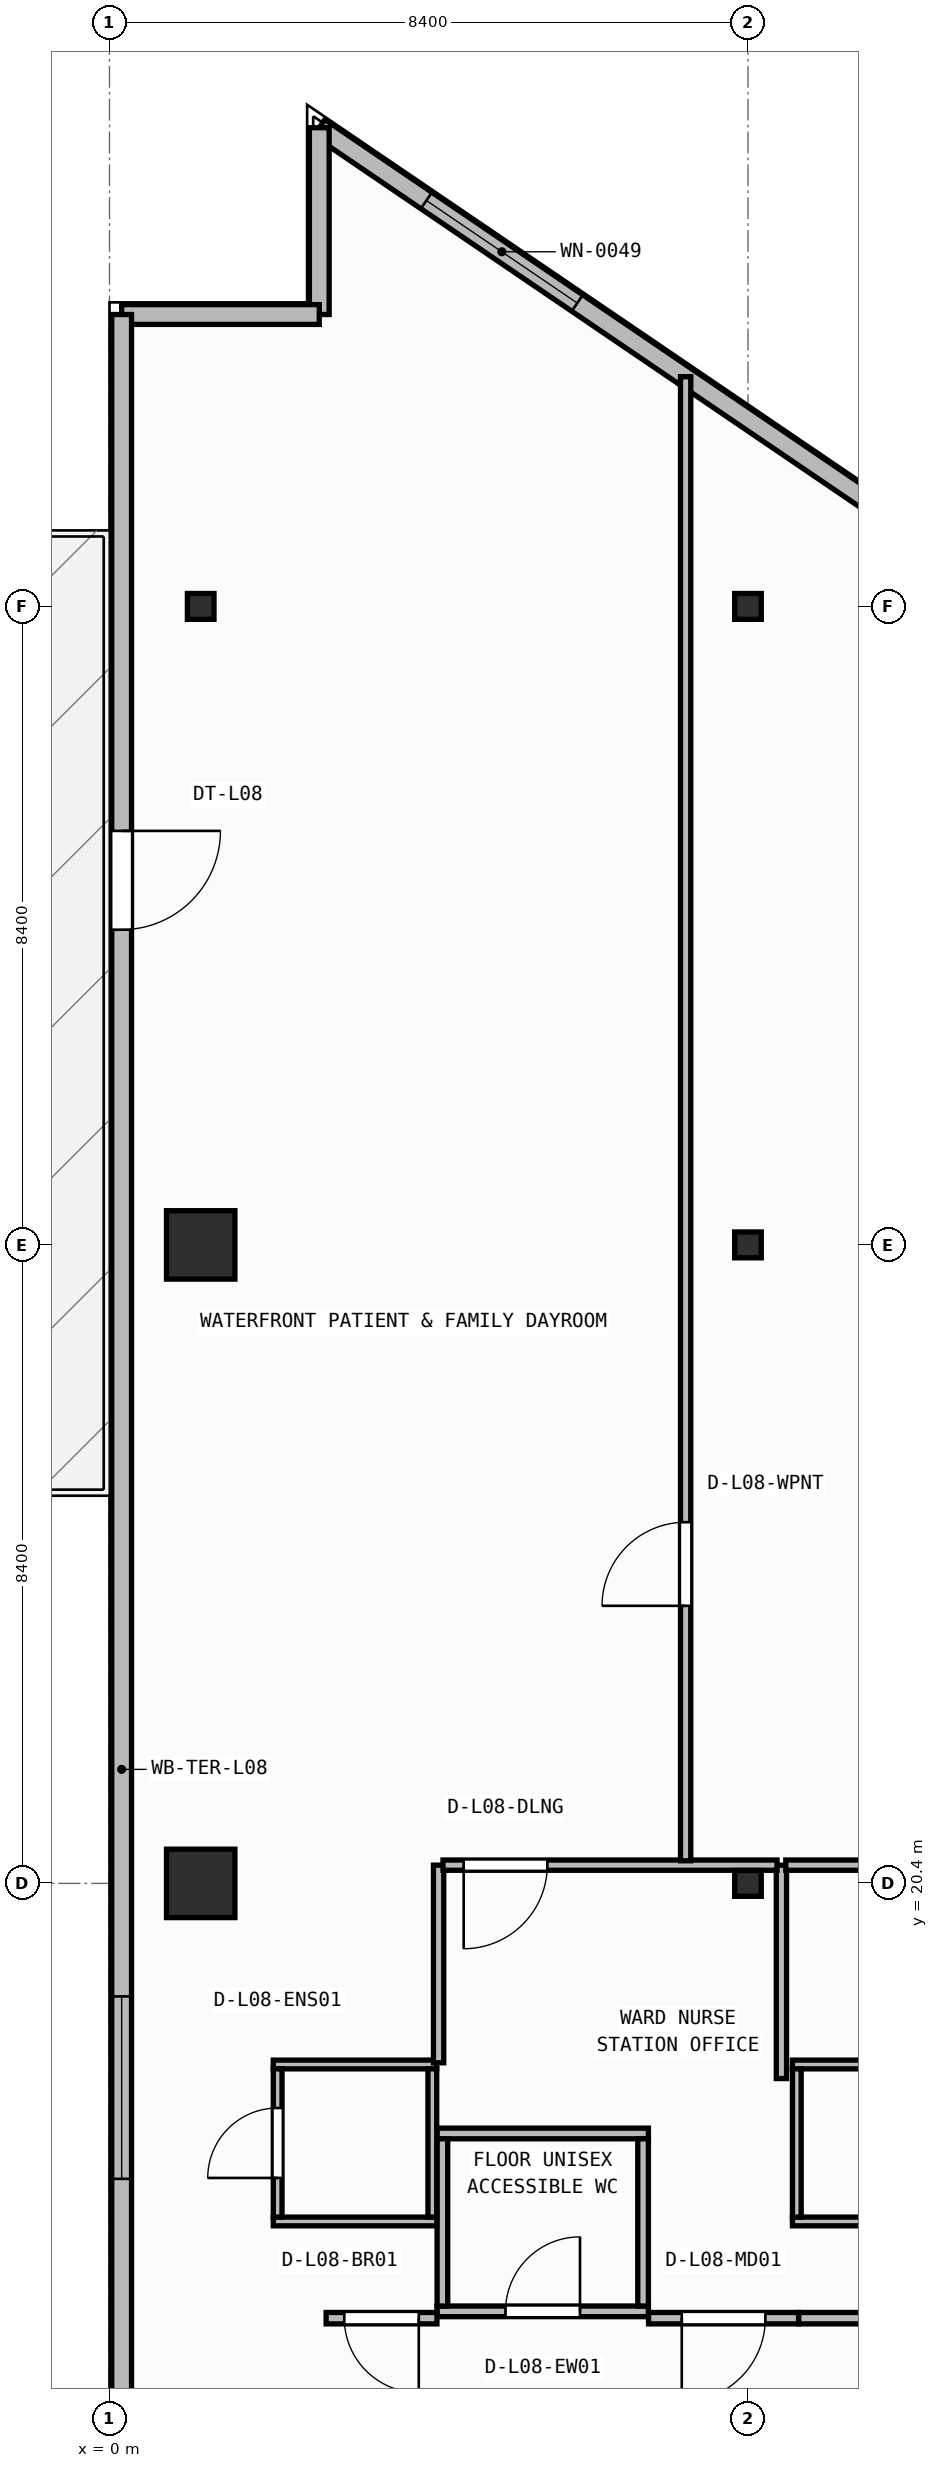
"""IFC4 building model, lengths in metres.
Left out: names, types, materials, properties, quantities, classifications, styles, units other than length and angle.
Written with IfcOpenShell. Run it as: python <this file> out.ifc"""

import sys

from ifc_helpers import new_model, si_unit, direction, frame, frame_2d, origin, origin_2d, place, context, subcontext, project, spatial, rectangle, i_section, extrude, element, fill, save


model = new_model("IFC4")
c1 = context("Model", 3, precision=1e-05, world=origin(), true_north=direction((0.0, 1.0)))
c2 = subcontext(c1, "Body", "Model", "MODEL_VIEW")
j1 = project(units=[si_unit("LENGTHUNIT", "METRE"), si_unit("PLANEANGLEUNIT", "RADIAN")], contexts=[c1])
p1 = place(None, origin())
s1 = spatial("IfcSite", under=j1, at=p1, CompositionType="ELEMENT")
p2 = place(p1, origin())
s2 = spatial("IfcBuilding", under=s1, at=p2, CompositionType="ELEMENT")
p3 = place(p2, frame((0.0, 0.0, 34.35)))
s3 = spatial("IfcBuildingStorey", under=s2, at=p3, CompositionType="ELEMENT", Elevation=34.35)
p4 = place(p3, frame((1.2, 20.4, 0.0), z_axis=(0.0, 0.0, 1.0), x_axis=(1.0, 0.0, 0.0)))
e1 = element("IfcColumn", 1, at=p4, inside=s3, PredefinedType="COLUMN", context=c2, shape_type="SweptSolid", body=[
    extrude(rectangle(XDim=0.9, YDim=0.9, at=origin_2d()), origin(), (0.0, 0.0, 1.0), 3.95),
])
p5 = place(p3, frame((8.4, 20.4, 0.0), z_axis=(0.0, 0.0, 1.0), x_axis=(1.0, 0.0, 0.0)))
e2 = element("IfcColumn", 2, at=p5, inside=s3, PredefinedType="COLUMN", context=c2, shape_type="SweptSolid", body=[
    extrude(i_section(OverallWidth=0.35, OverallDepth=0.34, WebThickness=0.016, FlangeThickness=0.028, at=origin_2d()), origin(), (0.0, 0.0, 1.0), 3.95),
])
p6 = place(p3, frame((1.2, 28.8, 0.0), z_axis=(0.0, 0.0, 1.0), x_axis=(1.0, 0.0, 0.0)))
e3 = element("IfcColumn", 3, at=p6, inside=s3, PredefinedType="COLUMN", context=c2, shape_type="SweptSolid", body=[
    extrude(rectangle(XDim=0.9, YDim=0.9, at=origin_2d()), origin(), (0.0, 0.0, 1.0), 3.95),
])
for number, where, z_axis, x_axis in (
    (4, (8.4, 28.8, 0.0), (0.0, 0.0, 1.0), (1.0, 0.0, 0.0)),
    (5, (1.2, 37.2, 0.0), (0.0, 0.0, 1.0), (1.0, 0.0, 0.0)),
    (6, (8.4, 37.2, 0.0), (0.0, 0.0, 1.0), (1.0, 0.0, 0.0)),
):
    element("IfcColumn", number, at=place(p3, frame(where, z_axis=z_axis, x_axis=x_axis)), inside=s3, PredefinedType="COLUMN", context=c2, shape_type="SweptSolid", body=[
        extrude(i_section(OverallWidth=0.35, OverallDepth=0.34, WebThickness=0.016, FlangeThickness=0.028, at=origin_2d()), origin(), (0.0, 0.0, 1.0), 3.95),
    ])
p7 = place(p3, frame((11.561, 37.517, 0.0), z_axis=(0.0, 0.0, 1.0), x_axis=(-0.827064743936, 0.562106670782, 0.0)))
e7 = element("IfcWall", 7, at=p7, inside=s3, PredefinedType="STANDARD", context=c2, shape_type="SweptSolid", body=[
    extrude(rectangle(XDim=10.641, YDim=0.26, at=frame_2d((5.32, 0.0))), origin(), (0.0, 0.0, 1.0), 3.71),
])
p8 = place(p7, frame((6.537, 0.0, 0.9)))
e8 = element("IfcOpeningElement", 8, at=p8, cuts=e7, PredefinedType="OPENING", context=c2, shape_type="SweptSolid", body=[
    extrude(rectangle(XDim=2.4, YDim=1.65, at=frame_2d((1.2, 0.825))), frame((0.0, 0.14, 0.0), z_axis=(0.0, -1.0, 0.0), x_axis=(1.0, 0.0, 0.0)), (0.0, 0.0, 1.0), 0.28),
])
p9 = place(p3, frame((2.76, 43.498, 0.0), z_axis=(0.0, 0.0, 1.0), x_axis=(0.0, -1.0, 0.0)))
e9 = element("IfcWall", 9, at=p9, inside=s3, PredefinedType="STANDARD", context=c2, shape_type="SweptSolid", body=[
    extrude(rectangle(XDim=2.458, YDim=0.26, at=frame_2d((1.229, 0.0))), origin(), (0.0, 0.0, 1.0), 3.71),
])
p10 = place(p3, frame((2.76, 41.04, 0.0), z_axis=(0.0, 0.0, 1.0), x_axis=(-1.0, 0.0, 0.0)))
e10 = element("IfcWall", 10, at=p10, inside=s3, PredefinedType="STANDARD", context=c2, shape_type="SweptSolid", body=[
    extrude(rectangle(XDim=2.6, YDim=0.26, at=frame_2d((1.3, 0.0))), origin(), (0.0, 0.0, 1.0), 3.71),
])
p11 = place(p3, frame((0.16, 41.04, 0.0), z_axis=(0.0, 0.0, 1.0), x_axis=(0.0, -1.0, 0.0)))
e11 = element("IfcWall", 11, at=p11, inside=s3, PredefinedType="STANDARD", context=c2, shape_type="SweptSolid", body=[
    extrude(rectangle(XDim=38.28, YDim=0.26, at=frame_2d((19.14, 0.0))), origin(), (0.0, 0.0, 1.0), 3.71),
])
p12 = place(p11, frame((6.793, 0.0, 0.0)))
e12 = element("IfcOpeningElement", 12, at=p12, cuts=e11, PredefinedType="OPENING", context=c2, shape_type="SweptSolid", body=[
    extrude(rectangle(XDim=1.3, YDim=2.15, at=frame_2d((0.65, 1.075))), frame((0.0, 0.14, 0.0), z_axis=(0.0, -1.0, 0.0), x_axis=(1.0, 0.0, 0.0)), (0.0, 0.0, 1.0), 0.28),
])
p13 = place(p11, frame((22.127, 0.0, 0.9)))
e13 = element("IfcOpeningElement", 13, at=p13, cuts=e11, PredefinedType="OPENING", context=c2, shape_type="SweptSolid", body=[
    extrude(rectangle(XDim=2.4, YDim=1.65, at=frame_2d((1.2, 0.825))), frame((0.0, 0.14, 0.0), z_axis=(0.0, -1.0, 0.0), x_axis=(1.0, 0.0, 0.0)), (0.0, 0.0, 1.0), 0.28),
])
p14 = place(p3, frame((4.31, 14.77, 0.0), z_axis=(0.0, 0.0, 1.0), x_axis=(1.0, 0.0, 0.0)))
e14 = element("IfcWall", 14, at=p14, inside=s3, PredefinedType="PARTITIONING", context=c2, shape_type="SweptSolid", body=[
    extrude(rectangle(XDim=2.78, YDim=0.14, at=frame_2d((1.39, 0.0))), origin(), (0.0, 0.0, 1.0), 3.71),
])
p15 = place(p14, frame((0.9, 0.0, 0.0)))
e15 = element("IfcOpeningElement", 15, at=p15, cuts=e14, PredefinedType="OPENING", context=c2, shape_type="SweptSolid", body=[
    extrude(rectangle(XDim=0.98, YDim=2.1, at=frame_2d((0.49, 1.05))), frame((0.0, 0.08, 0.0), z_axis=(0.0, -1.0, 0.0), x_axis=(1.0, 0.0, 0.0)), (0.0, 0.0, 1.0), 0.16),
])
p16 = place(p3, frame((4.31, 17.11, 0.0), z_axis=(0.0, 0.0, 1.0), x_axis=(1.0, 0.0, 0.0)))
e16 = element("IfcWall", 16, at=p16, inside=s3, PredefinedType="PARTITIONING", context=c2, shape_type="SweptSolid", body=[
    extrude(rectangle(XDim=2.78, YDim=0.14, at=frame_2d((1.39, 0.0))), origin(), (0.0, 0.0, 1.0), 3.71),
])
for number, where, z_axis, x_axis in (
    (17, (4.38, 14.84, 0.0), (0.0, 0.0, 1.0), (0.0, 1.0, 0.0)),
    (18, (7.02, 14.84, 0.0), (0.0, 0.0, 1.0), (0.0, 1.0, 0.0)),
):
    element("IfcWall", number, at=place(p3, frame(where, z_axis=z_axis, x_axis=x_axis)), inside=s3, PredefinedType="PARTITIONING", context=c2, shape_type="SweptSolid", body=[
        extrude(rectangle(XDim=2.2, YDim=0.14, at=frame_2d((1.1, 0.0))), origin(), (0.0, 0.0, 1.0), 3.71),
    ])
for number, where, z_axis, x_axis in (
    (19, (2.155, 15.952, 0.0), (0.0, 0.0, 1.0), (1.0, 0.0, 0.0)),
    (20, (2.155, 18.018, 0.0), (0.0, 0.0, 1.0), (1.0, 0.0, 0.0)),
):
    element("IfcWall", number, at=place(p3, frame(where, z_axis=z_axis, x_axis=x_axis)), inside=s3, PredefinedType="PARTITIONING", context=c2, shape_type="SweptSolid", body=[
        extrude(rectangle(XDim=2.15, YDim=0.115, at=frame_2d((1.075, 0.0))), origin(), (0.0, 0.0, 1.0), 3.71),
    ])
p17 = place(p3, frame((2.212, 16.01, 0.0), z_axis=(0.0, 0.0, 1.0), x_axis=(0.0, 1.0, 0.0)))
e21 = element("IfcWall", 21, at=p17, inside=s3, PredefinedType="PARTITIONING", context=c2, shape_type="SweptSolid", body=[
    extrude(rectangle(XDim=1.95, YDim=0.115, at=frame_2d((0.975, 0.0))), origin(), (0.0, 0.0, 1.0), 3.71),
])
p18 = place(p17, frame((0.515, 0.0, 0.0)))
e22 = element("IfcOpeningElement", 22, at=p18, cuts=e21, PredefinedType="OPENING", context=c2, shape_type="SweptSolid", body=[
    extrude(rectangle(XDim=0.92, YDim=2.1, at=frame_2d((0.46, 1.05))), frame((0.0, 0.067, 0.0), z_axis=(0.0, -1.0, 0.0), x_axis=(1.0, 0.0, 0.0)), (0.0, 0.0, 1.0), 0.135),
])
p19 = place(p3, frame((4.248, 16.01, 0.0), z_axis=(0.0, 0.0, 1.0), x_axis=(0.0, 1.0, 0.0)))
e23 = element("IfcWall", 23, at=p19, inside=s3, PredefinedType="PARTITIONING", context=c2, shape_type="SweptSolid", body=[
    extrude(rectangle(XDim=1.95, YDim=0.115, at=frame_2d((0.975, 0.0))), origin(), (0.0, 0.0, 1.0), 3.71),
])
for number, where, z_axis, x_axis in (
    (24, (8.985, 15.952, 0.0), (0.0, 0.0, 1.0), (1.0, 0.0, 0.0)),
    (25, (8.985, 18.018, 0.0), (0.0, 0.0, 1.0), (1.0, 0.0, 0.0)),
):
    element("IfcWall", number, at=place(p3, frame(where, z_axis=z_axis, x_axis=x_axis)), inside=s3, PredefinedType="PARTITIONING", context=c2, shape_type="SweptSolid", body=[
        extrude(rectangle(XDim=2.15, YDim=0.115, at=frame_2d((1.075, 0.0))), origin(), (0.0, 0.0, 1.0), 3.71),
    ])
p20 = place(p3, frame((9.042, 16.01, 0.0), z_axis=(0.0, 0.0, 1.0), x_axis=(0.0, 1.0, 0.0)))
e26 = element("IfcWall", 26, at=p20, inside=s3, PredefinedType="PARTITIONING", context=c2, shape_type="SweptSolid", body=[
    extrude(rectangle(XDim=1.95, YDim=0.115, at=frame_2d((0.975, 0.0))), origin(), (0.0, 0.0, 1.0), 3.71),
])
p21 = place(p3, frame((4.308, 14.68, 0.0), z_axis=(0.0, 0.0, 1.0), x_axis=(-1.0, 0.0, 0.0)))
e27 = element("IfcWall", 27, at=p21, inside=s3, PredefinedType="PARTITIONING", context=c2, shape_type="SweptSolid", body=[
    extrude(rectangle(XDim=1.458, YDim=0.15, at=frame_2d((0.729, 0.0))), origin(), (0.0, 0.0, 1.0), 3.71),
])
p22 = place(p21, frame((0.239, 0.0, 0.0)))
e28 = element("IfcOpeningElement", 28, at=p22, cuts=e27, PredefinedType="OPENING", context=c2, shape_type="SweptSolid", body=[
    extrude(rectangle(XDim=0.98, YDim=2.1, at=frame_2d((0.49, 1.05))), frame((0.0, 0.085, 0.0), z_axis=(0.0, -1.0, 0.0), x_axis=(1.0, 0.0, 0.0)), (0.0, 0.0, 1.0), 0.17),
])
p23 = place(p3, frame((9.066, 14.68, 0.0), z_axis=(0.0, 0.0, 1.0), x_axis=(-1.0, 0.0, 0.0)))
e29 = element("IfcWall", 29, at=p23, inside=s3, PredefinedType="PARTITIONING", context=c2, shape_type="SweptSolid", body=[
    extrude(rectangle(XDim=1.974, YDim=0.15, at=frame_2d((0.987, 0.0))), origin(), (0.0, 0.0, 1.0), 3.71),
])
p24 = place(p23, frame((0.437, 0.0, 0.0)))
e30 = element("IfcOpeningElement", 30, at=p24, cuts=e29, PredefinedType="OPENING", context=c2, shape_type="SweptSolid", body=[
    extrude(rectangle(XDim=1.1, YDim=2.1, at=frame_2d((0.55, 1.05))), frame((0.0, 0.085, 0.0), z_axis=(0.0, -1.0, 0.0), x_axis=(1.0, 0.0, 0.0)), (0.0, 0.0, 1.0), 0.17),
])
p25 = place(p3, frame((13.936, 14.68, 0.0), z_axis=(0.0, 0.0, 1.0), x_axis=(-1.0, 0.0, 0.0)))
e31 = element("IfcWall", 31, at=p25, inside=s3, PredefinedType="PARTITIONING", context=c2, shape_type="SweptSolid", body=[
    extrude(rectangle(XDim=4.868, YDim=0.15, at=frame_2d((2.434, 0.0))), origin(), (0.0, 0.0, 1.0), 3.71),
])
p26 = place(p25, frame((1.784, 0.0, 0.0)))
e32 = element("IfcOpeningElement", 32, at=p26, cuts=e31, PredefinedType="OPENING", context=c2, shape_type="SweptSolid", body=[
    extrude(rectangle(XDim=1.3, YDim=2.15, at=frame_2d((0.65, 1.075))), frame((0.0, 0.085, 0.0), z_axis=(0.0, -1.0, 0.0), x_axis=(1.0, 0.0, 0.0)), (0.0, 0.0, 1.0), 0.17),
])
p27 = place(p3, frame((4.33, 18.04, 0.0), z_axis=(0.0, 0.0, 1.0), x_axis=(0.0, 1.0, 0.0)))
e33 = element("IfcWall", 33, at=p27, inside=s3, PredefinedType="PARTITIONING", context=c2, shape_type="SweptSolid", body=[
    extrude(rectangle(XDim=2.6, YDim=0.135, at=frame_2d((1.3, 0.0))), origin(), (0.0, 0.0, 1.0), 3.71),
])
p28 = place(p3, frame((8.84, 17.833, 0.0), z_axis=(0.0, 0.0, 1.0), x_axis=(0.0, 1.0, 0.0)))
e34 = element("IfcWall", 34, at=p28, inside=s3, PredefinedType="PARTITIONING", context=c2, shape_type="SweptSolid", body=[
    extrude(rectangle(XDim=2.807, YDim=0.135, at=frame_2d((1.404, 0.0))), origin(), (0.0, 0.0, 1.0), 3.71),
])
p29 = place(p3, frame((8.782, 20.64, 0.0), z_axis=(0.0, 0.0, 1.0), x_axis=(-1.0, 0.0, 0.0)))
e35 = element("IfcWall", 35, at=p29, inside=s3, PredefinedType="PARTITIONING", context=c2, shape_type="SweptSolid", body=[
    extrude(rectangle(XDim=4.395, YDim=0.135, at=frame_2d((2.198, 0.0))), origin(), (0.0, 0.0, 1.0), 3.073),
])
p30 = place(p29, frame((3.023, 0.0, 0.0)))
e36 = element("IfcOpeningElement", 36, at=p30, cuts=e35, PredefinedType="OPENING", context=c2, shape_type="SweptSolid", body=[
    extrude(rectangle(XDim=1.1, YDim=2.1, at=frame_2d((0.55, 1.05))), frame((0.0, 0.077, 0.0), z_axis=(0.0, -1.0, 0.0), x_axis=(1.0, 0.0, 0.0)), (0.0, 0.0, 1.0), 0.155),
])
p31 = place(p3, frame((13.71, 20.64, 0.0), z_axis=(0.0, 0.0, 1.0), x_axis=(-1.0, 0.0, 0.0)))
e37 = element("IfcWall", 37, at=p31, inside=s3, PredefinedType="PARTITIONING", context=c2, shape_type="SweptSolid", body=[
    extrude(rectangle(XDim=4.812, YDim=0.135, at=frame_2d((2.406, 0.0))), origin(), (0.0, 0.0, 1.0), 3.073),
])
p32 = place(p3, frame((7.58, 20.698, 0.0), z_axis=(0.0, 0.0, 1.0), x_axis=(0.0, 1.0, 0.0)))
e38 = element("IfcWall", 38, at=p32, inside=s3, PredefinedType="PARTITIONING", context=c2, shape_type="SweptSolid", body=[
    extrude(rectangle(XDim=19.524, YDim=0.135, at=frame_2d((9.762, 0.0))), origin(), (0.0, 0.0, 1.0), 3.71),
])
p33 = place(p32, frame((3.354, 0.0, 0.0)))
e39 = element("IfcOpeningElement", 39, at=p33, cuts=e38, PredefinedType="OPENING", context=c2, shape_type="SweptSolid", body=[
    extrude(rectangle(XDim=1.1, YDim=2.1, at=frame_2d((0.55, 1.05))), frame((0.0, 0.077, 0.0), z_axis=(0.0, -1.0, 0.0), x_axis=(1.0, 0.0, 0.0)), (0.0, 0.0, 1.0), 0.155),
])
p34 = place(p8, origin())
e40 = element("IfcWindow", 40, at=p34, inside=s3, PartitioningType="SINGLE_PANEL", PredefinedType="WINDOW", context=c2, shape_type="SweptSolid", body=[
    extrude(rectangle(XDim=2.4, YDim=1.65, at=frame_2d((1.2, 0.825))), frame((0.0, 0.03, 0.0), z_axis=(0.0, -1.0, 0.0), x_axis=(1.0, 0.0, 0.0)), (0.0, 0.0, 1.0), 0.06),
])
fill(e8, e40)
p35 = place(p12, origin())
e41 = element("IfcDoor", 41, at=p35, inside=s3, OperationType="SINGLE_SWING_LEFT", PredefinedType="DOOR", context=c2, shape_type="SweptSolid", body=[
    extrude(rectangle(XDim=1.3, YDim=2.15, at=frame_2d((0.65, 1.075))), frame((0.0, 0.025, 0.0), z_axis=(0.0, -1.0, 0.0), x_axis=(1.0, 0.0, 0.0)), (0.0, 0.0, 1.0), 0.05),
])
fill(e12, e41)
p36 = place(p15, origin())
e42 = element("IfcDoor", 42, at=p36, inside=s3, OperationType="SINGLE_SWING_RIGHT", PredefinedType="DOOR", context=c2, shape_type="SweptSolid", body=[
    extrude(rectangle(XDim=0.98, YDim=2.1, at=frame_2d((0.49, 1.05))), frame((0.0, 0.025, 0.0), z_axis=(0.0, -1.0, 0.0), x_axis=(1.0, 0.0, 0.0)), (0.0, 0.0, 1.0), 0.05),
])
fill(e15, e42)
p37 = place(p18, origin())
e43 = element("IfcDoor", 43, at=p37, inside=s3, OperationType="SINGLE_SWING_LEFT", PredefinedType="DOOR", context=c2, shape_type="SweptSolid", body=[
    extrude(rectangle(XDim=0.92, YDim=2.1, at=frame_2d((0.46, 1.05))), frame((0.0, 0.025, 0.0), z_axis=(0.0, -1.0, 0.0), x_axis=(1.0, 0.0, 0.0)), (0.0, 0.0, 1.0), 0.05),
])
fill(e22, e43)
p38 = place(p22, origin())
e44 = element("IfcDoor", 44, at=p38, inside=s3, OperationType="SINGLE_SWING_LEFT", PredefinedType="DOOR", context=c2, shape_type="SweptSolid", body=[
    extrude(rectangle(XDim=0.98, YDim=2.1, at=frame_2d((0.49, 1.05))), frame((0.0, 0.025, 0.0), z_axis=(0.0, -1.0, 0.0), x_axis=(1.0, 0.0, 0.0)), (0.0, 0.0, 1.0), 0.05),
])
fill(e28, e44)
p39 = place(p24, origin())
e45 = element("IfcDoor", 45, at=p39, inside=s3, OperationType="SINGLE_SWING_RIGHT", PredefinedType="DOOR", context=c2, shape_type="SweptSolid", body=[
    extrude(rectangle(XDim=1.1, YDim=2.1, at=frame_2d((0.55, 1.05))), frame((0.0, 0.025, 0.0), z_axis=(0.0, -1.0, 0.0), x_axis=(1.0, 0.0, 0.0)), (0.0, 0.0, 1.0), 0.05),
])
fill(e30, e45)
p40 = place(p30, origin())
e46 = element("IfcDoor", 46, at=p40, inside=s3, OperationType="SINGLE_SWING_RIGHT", PredefinedType="DOOR", context=c2, shape_type="SweptSolid", body=[
    extrude(rectangle(XDim=1.1, YDim=2.1, at=frame_2d((0.55, 1.05))), frame((0.0, 0.025, 0.0), z_axis=(0.0, -1.0, 0.0), x_axis=(1.0, 0.0, 0.0)), (0.0, 0.0, 1.0), 0.05),
])
fill(e36, e46)
p41 = place(p33, origin())
e47 = element("IfcDoor", 47, at=p41, inside=s3, OperationType="SINGLE_SWING_LEFT", PredefinedType="DOOR", context=c2, shape_type="SweptSolid", body=[
    extrude(rectangle(XDim=1.1, YDim=2.1, at=frame_2d((0.55, 1.05))), frame((0.0, 0.025, 0.0), z_axis=(0.0, -1.0, 0.0), x_axis=(1.0, 0.0, 0.0)), (0.0, 0.0, 1.0), 0.05),
])
fill(e39, e47)
p42 = place(p13, origin())
e48 = element("IfcWindow", 48, at=p42, inside=s3, PartitioningType="SINGLE_PANEL", PredefinedType="WINDOW", context=c2, shape_type="SweptSolid", body=[
    extrude(rectangle(XDim=2.4, YDim=1.65, at=frame_2d((1.2, 0.825))), frame((0.0, 0.03, 0.0), z_axis=(0.0, -1.0, 0.0), x_axis=(1.0, 0.0, 0.0)), (0.0, 0.0, 1.0), 0.06),
])
fill(e13, e48)
save(model, sys.argv[1])
